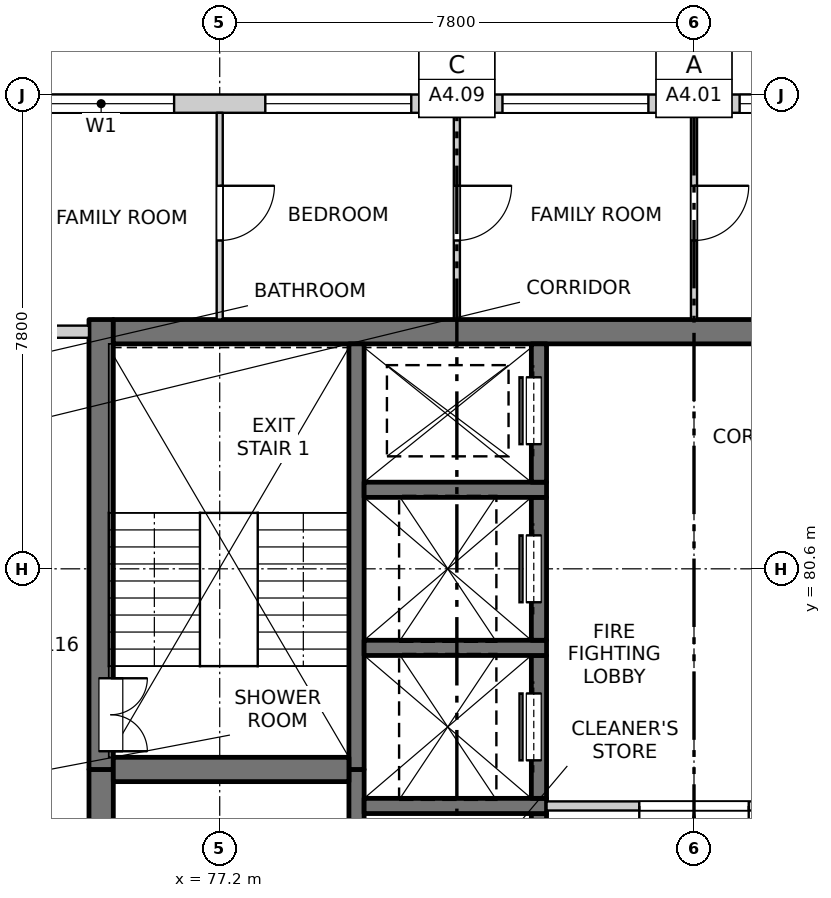
"""IFC4 building model, lengths in metres.
Left out: names, types, materials, properties, quantities, classifications, styles, units other than length and angle.
Written with IfcOpenShell. Run it as: python <this file> out.ifc"""

import sys

from ifc_helpers import new_model, si_unit, direction, frame, frame_2d, origin, place, context, subcontext, project, spatial, rectangle, extrude, element, fill, save


model = new_model("IFC4")
c1 = context("Model", 3, precision=1e-05, world=origin(), true_north=direction((0.0, 1.0)))
c2 = subcontext(c1, "Body", "Model", "MODEL_VIEW")
j1 = project(units=[si_unit("LENGTHUNIT", "METRE"), si_unit("PLANEANGLEUNIT", "RADIAN")], contexts=[c1])
p1 = place(None, origin())
s1 = spatial("IfcSite", under=j1, at=p1, CompositionType="ELEMENT")
p2 = place(p1, origin())
s2 = spatial("IfcBuilding", under=s1, at=p2, CompositionType="ELEMENT")
p3 = place(p2, frame((0.0, 0.0, 221.1)))
s3 = spatial("IfcBuildingStorey", under=s2, at=p3, CompositionType="ELEMENT", Elevation=221.1)
p4 = place(p3, frame((75.25, 55.05, -0.25), z_axis=(0.0, 0.0, 1.0), x_axis=(0.0, 1.0, 0.0)))
e1 = element("IfcWall", 1, at=p4, inside=s3, PredefinedType="SOLIDWALL", context=c2, shape_type="SweptSolid", body=[
    extrude(rectangle(XDim=22.25, YDim=0.4, at=frame_2d((11.125, 0.0))), origin(), (0.0, 0.0, 1.0), 3.4),
])
p5 = place(p4, frame((7.4, 0.0, 0.25)))
e2 = element("IfcOpeningElement", 2, at=p5, cuts=e1, PredefinedType="OPENING", context=c2, shape_type="SweptSolid", body=[
    extrude(rectangle(XDim=0.9, YDim=2.1, at=frame_2d((0.45, 1.05))), frame((0.0, 0.21, 0.0), z_axis=(0.0, -1.0, 0.0), x_axis=(1.0, 0.0, 0.0)), (0.0, 0.0, 1.0), 0.42),
])
p6 = place(p4, frame((13.7, 0.0, 0.25)))
e3 = element("IfcOpeningElement", 3, at=p6, cuts=e1, PredefinedType="OPENING", context=c2, shape_type="SweptSolid", body=[
    extrude(rectangle(XDim=0.9, YDim=2.1, at=frame_2d((0.45, 1.05))), frame((0.0, 0.21, 0.0), z_axis=(0.0, -1.0, 0.0), x_axis=(1.0, 0.0, 0.0)), (0.0, 0.0, 1.0), 0.42),
])
p7 = place(p4, frame((20.0, 0.0, 0.25)))
e4 = element("IfcOpeningElement", 4, at=p7, cuts=e1, PredefinedType="OPENING", context=c2, shape_type="SweptSolid", body=[
    extrude(rectangle(XDim=0.9, YDim=2.1, at=frame_2d((0.45, 1.05))), frame((0.0, 0.21, 0.0), z_axis=(0.0, -1.0, 0.0), x_axis=(1.0, 0.0, 0.0)), (0.0, 0.0, 1.0), 0.42),
])
p8 = place(p3, frame((75.25, 77.3, -0.25), z_axis=(0.0, 0.0, 1.0), x_axis=(0.0, 1.0, 0.0)))
e5 = element("IfcWall", 5, at=p8, inside=s3, PredefinedType="SOLIDWALL", context=c2, shape_type="SweptSolid", body=[
    extrude(rectangle(XDim=7.4, YDim=0.4, at=frame_2d((3.7, 0.0))), origin(), (0.0, 0.0, 1.0), 3.4),
])
p9 = place(p8, frame((0.3, 0.0, 0.25)))
e6 = element("IfcOpeningElement", 6, at=p9, cuts=e5, PredefinedType="OPENING", context=c2, shape_type="SweptSolid", body=[
    extrude(rectangle(XDim=1.2, YDim=2.1, at=frame_2d((0.6, 1.05))), frame((0.0, 0.21, 0.0), z_axis=(0.0, -1.0, 0.0), x_axis=(1.0, 0.0, 0.0)), (0.0, 0.0, 1.0), 0.42),
])
p10 = place(p3, frame((75.45, 84.5, -0.25), z_axis=(0.0, 0.0, 1.0), x_axis=(1.0, 0.0, 0.0)))
e7 = element("IfcWall", 7, at=p10, inside=s3, PredefinedType="SOLIDWALL", context=c2, shape_type="SweptSolid", body=[
    extrude(rectangle(XDim=19.1, YDim=0.4, at=frame_2d((9.55, 0.0))), origin(), (0.0, 0.0, 1.0), 3.4),
])
p11 = place(p3, frame((79.45, 60.975, -0.25), z_axis=(0.0, 0.0, 1.0), x_axis=(0.0, 1.0, 0.0)))
e8 = element("IfcWall", 8, at=p11, inside=s3, PredefinedType="SOLIDWALL", context=c2, shape_type="SweptSolid", body=[
    extrude(rectangle(XDim=16.325, YDim=0.25, at=frame_2d((8.163, 0.0))), origin(), (0.0, 0.0, 1.0), 3.4),
])
p12 = place(p3, frame((79.45, 77.3, -0.25), z_axis=(0.0, 0.0, 1.0), x_axis=(0.0, 1.0, 0.0)))
e9 = element("IfcWall", 9, at=p12, inside=s3, PredefinedType="SOLIDWALL", context=c2, shape_type="SweptSolid", body=[
    extrude(rectangle(XDim=7.0, YDim=0.25, at=frame_2d((3.5, 0.0))), origin(), (0.0, 0.0, 1.0), 3.4),
])
p13 = place(p3, frame((82.45, 74.225, -0.25), z_axis=(0.0, 0.0, 1.0), x_axis=(0.0, 1.0, 0.0)))
e10 = element("IfcWall", 10, at=p13, inside=s3, PredefinedType="SOLIDWALL", context=c2, shape_type="SweptSolid", body=[
    extrude(rectangle(XDim=2.35, YDim=0.25, at=frame_2d((1.175, 0.0))), origin(), (0.0, 0.0, 1.0), 3.4),
])
p14 = place(p13, frame((0.725, 0.0, 0.25)))
e11 = element("IfcOpeningElement", 11, at=p14, cuts=e10, PredefinedType="OPENING", context=c2, shape_type="SweptSolid", body=[
    extrude(rectangle(XDim=0.9, YDim=2.1, at=frame_2d((0.45, 1.05))), frame((0.0, 0.135, 0.0), z_axis=(0.0, -1.0, 0.0), x_axis=(1.0, 0.0, 0.0)), (0.0, 0.0, 1.0), 0.27),
])
p15 = place(p3, frame((79.575, 76.7, -0.25), z_axis=(0.0, 0.0, 1.0), x_axis=(1.0, 0.0, 0.0)))
e12 = element("IfcWall", 12, at=p15, inside=s3, PredefinedType="SOLIDWALL", context=c2, shape_type="SweptSolid", body=[
    extrude(rectangle(XDim=3.0, YDim=0.25, at=frame_2d((1.5, 0.0))), origin(), (0.0, 0.0, 1.0), 3.4),
])
p16 = place(p3, frame((82.45, 76.825, -0.25), z_axis=(0.0, 0.0, 1.0), x_axis=(0.0, 1.0, 0.0)))
e13 = element("IfcWall", 13, at=p16, inside=s3, PredefinedType="SOLIDWALL", context=c2, shape_type="SweptSolid", body=[
    extrude(rectangle(XDim=2.35, YDim=0.25, at=frame_2d((1.175, 0.0))), origin(), (0.0, 0.0, 1.0), 3.4),
])
p17 = place(p16, frame((0.625, 0.0, 0.25)))
e14 = element("IfcOpeningElement", 14, at=p17, cuts=e13, PredefinedType="OPENING", context=c2, shape_type="SweptSolid", body=[
    extrude(rectangle(XDim=1.1, YDim=2.1, at=frame_2d((0.55, 1.05))), frame((0.0, 0.135, 0.0), z_axis=(0.0, -1.0, 0.0), x_axis=(1.0, 0.0, 0.0)), (0.0, 0.0, 1.0), 0.27),
])
p18 = place(p3, frame((79.575, 79.3, -0.25), z_axis=(0.0, 0.0, 1.0), x_axis=(1.0, 0.0, 0.0)))
e15 = element("IfcWall", 15, at=p18, inside=s3, PredefinedType="SOLIDWALL", context=c2, shape_type="SweptSolid", body=[
    extrude(rectangle(XDim=3.0, YDim=0.25, at=frame_2d((1.5, 0.0))), origin(), (0.0, 0.0, 1.0), 3.4),
])
p19 = place(p3, frame((82.45, 79.425, -0.25), z_axis=(0.0, 0.0, 1.0), x_axis=(0.0, 1.0, 0.0)))
e16 = element("IfcWall", 16, at=p19, inside=s3, PredefinedType="SOLIDWALL", context=c2, shape_type="SweptSolid", body=[
    extrude(rectangle(XDim=2.35, YDim=0.25, at=frame_2d((1.175, 0.0))), origin(), (0.0, 0.0, 1.0), 3.4),
])
p20 = place(p19, frame((0.625, 0.0, 0.25)))
e17 = element("IfcOpeningElement", 17, at=p20, cuts=e16, PredefinedType="OPENING", context=c2, shape_type="SweptSolid", body=[
    extrude(rectangle(XDim=1.1, YDim=2.1, at=frame_2d((0.55, 1.05))), frame((0.0, 0.135, 0.0), z_axis=(0.0, -1.0, 0.0), x_axis=(1.0, 0.0, 0.0)), (0.0, 0.0, 1.0), 0.27),
])
p21 = place(p3, frame((79.575, 81.9, -0.25), z_axis=(0.0, 0.0, 1.0), x_axis=(1.0, 0.0, 0.0)))
e18 = element("IfcWall", 18, at=p21, inside=s3, PredefinedType="SOLIDWALL", context=c2, shape_type="SweptSolid", body=[
    extrude(rectangle(XDim=3.0, YDim=0.25, at=frame_2d((1.5, 0.0))), origin(), (0.0, 0.0, 1.0), 3.4),
])
p22 = place(p3, frame((82.45, 82.025, -0.25), z_axis=(0.0, 0.0, 1.0), x_axis=(0.0, 1.0, 0.0)))
e19 = element("IfcWall", 19, at=p22, inside=s3, PredefinedType="SOLIDWALL", context=c2, shape_type="SweptSolid", body=[
    extrude(rectangle(XDim=2.275, YDim=0.25, at=frame_2d((1.138, 0.0))), origin(), (0.0, 0.0, 1.0), 3.4),
])
p23 = place(p22, frame((0.625, 0.0, 0.25)))
e20 = element("IfcOpeningElement", 20, at=p23, cuts=e19, PredefinedType="OPENING", context=c2, shape_type="SweptSolid", body=[
    extrude(rectangle(XDim=1.1, YDim=2.1, at=frame_2d((0.55, 1.05))), frame((0.0, 0.135, 0.0), z_axis=(0.0, -1.0, 0.0), x_axis=(1.0, 0.0, 0.0)), (0.0, 0.0, 1.0), 0.27),
])
p24 = place(p3, frame((75.45, 77.3, -0.25), z_axis=(0.0, 0.0, 1.0), x_axis=(1.0, 0.0, 0.0)))
e21 = element("IfcWall", 21, at=p24, inside=s3, PredefinedType="SOLIDWALL", context=c2, shape_type="SweptSolid", body=[
    extrude(rectangle(XDim=3.875, YDim=0.4, at=frame_2d((1.938, 0.0))), origin(), (0.0, 0.0, 1.0), 3.4),
])
p25 = place(p3, frame((73.7, 88.25, 0.0), z_axis=(0.0, 0.0, 1.0), x_axis=(1.0, 0.0, 0.0)))
e22 = element("IfcWall", 22, at=p25, inside=s3, PredefinedType="SOLIDWALL", context=c2, shape_type="SweptSolid", body=[
    extrude(rectangle(XDim=22.6, YDim=0.3, at=frame_2d((11.3, 0.0))), origin(), (0.0, 0.0, 1.0), 2.7),
])
p26 = place(p25, frame((0.35, 0.0, 0.9)))
e23 = element("IfcOpeningElement", 23, at=p26, cuts=e22, PredefinedType="OPENING", context=c2, shape_type="SweptSolid", body=[
    extrude(rectangle(XDim=2.4, YDim=1.8, at=frame_2d((1.2, 0.9))), frame((0.0, 0.16, 0.0), z_axis=(0.0, -1.0, 0.0), x_axis=(1.0, 0.0, 0.0)), (0.0, 0.0, 1.0), 0.32),
])
p27 = place(p25, frame((4.25, 0.0, 0.9)))
e24 = element("IfcOpeningElement", 24, at=p27, cuts=e22, PredefinedType="OPENING", context=c2, shape_type="SweptSolid", body=[
    extrude(rectangle(XDim=2.4, YDim=1.8, at=frame_2d((1.2, 0.9))), frame((0.0, 0.16, 0.0), z_axis=(0.0, -1.0, 0.0), x_axis=(1.0, 0.0, 0.0)), (0.0, 0.0, 1.0), 0.32),
])
p28 = place(p25, frame((8.15, 0.0, 0.9)))
e25 = element("IfcOpeningElement", 25, at=p28, cuts=e22, PredefinedType="OPENING", context=c2, shape_type="SweptSolid", body=[
    extrude(rectangle(XDim=2.4, YDim=1.8, at=frame_2d((1.2, 0.9))), frame((0.0, 0.16, 0.0), z_axis=(0.0, -1.0, 0.0), x_axis=(1.0, 0.0, 0.0)), (0.0, 0.0, 1.0), 0.32),
])
p29 = place(p25, frame((12.05, 0.0, 0.9)))
e26 = element("IfcOpeningElement", 26, at=p29, cuts=e22, PredefinedType="OPENING", context=c2, shape_type="SweptSolid", body=[
    extrude(rectangle(XDim=2.4, YDim=1.8, at=frame_2d((1.2, 0.9))), frame((0.0, 0.16, 0.0), z_axis=(0.0, -1.0, 0.0), x_axis=(1.0, 0.0, 0.0)), (0.0, 0.0, 1.0), 0.32),
])
p30 = place(p25, frame((15.95, 0.0, 0.9)))
e27 = element("IfcOpeningElement", 27, at=p30, cuts=e22, PredefinedType="OPENING", context=c2, shape_type="SweptSolid", body=[
    extrude(rectangle(XDim=2.4, YDim=1.8, at=frame_2d((1.2, 0.9))), frame((0.0, 0.16, 0.0), z_axis=(0.0, -1.0, 0.0), x_axis=(1.0, 0.0, 0.0)), (0.0, 0.0, 1.0), 0.32),
])
p31 = place(p25, frame((19.85, 0.0, 0.9)))
e28 = element("IfcOpeningElement", 28, at=p31, cuts=e22, PredefinedType="OPENING", context=c2, shape_type="SweptSolid", body=[
    extrude(rectangle(XDim=2.4, YDim=1.8, at=frame_2d((1.2, 0.9))), frame((0.0, 0.16, 0.0), z_axis=(0.0, -1.0, 0.0), x_axis=(1.0, 0.0, 0.0)), (0.0, 0.0, 1.0), 0.32),
])
p32 = place(p3, frame((82.575, 76.7, 0.0), z_axis=(0.0, 0.0, 1.0), x_axis=(1.0, 0.0, 0.0)))
e29 = element("IfcWall", 29, at=p32, inside=s3, PredefinedType="PARTITIONING", context=c2, shape_type="SweptSolid", body=[
    extrude(rectangle(XDim=4.85, YDim=0.15, at=frame_2d((2.425, 0.0))), origin(), (0.0, 0.0, 1.0), 3.15),
])
p33 = place(p32, frame((1.525, 0.0, 0.0)))
e30 = element("IfcOpeningElement", 30, at=p33, cuts=e29, PredefinedType="OPENING", context=c2, shape_type="SweptSolid", body=[
    extrude(rectangle(XDim=1.8, YDim=2.1, at=frame_2d((0.9, 1.05))), frame((0.0, 0.085, 0.0), z_axis=(0.0, -1.0, 0.0), x_axis=(1.0, 0.0, 0.0)), (0.0, 0.0, 1.0), 0.17),
])
p34 = place(p3, frame((73.2, 84.5, 0.0), z_axis=(0.0, 0.0, 1.0), x_axis=(1.0, 0.0, 0.0)))
e31 = element("IfcWall", 31, at=p34, inside=s3, PredefinedType="PARTITIONING", context=c2, shape_type="SweptSolid", body=[
    extrude(rectangle(XDim=1.85, YDim=0.2, at=frame_2d((0.925, 0.0))), origin(), (0.0, 0.0, 1.0), 3.15),
])
p35 = place(p3, frame((77.2, 84.7, 0.0), z_axis=(0.0, 0.0, 1.0), x_axis=(0.0, 1.0, 0.0)))
e32 = element("IfcWall", 32, at=p35, inside=s3, PredefinedType="PARTITIONING", context=c2, shape_type="SweptSolid", body=[
    extrude(rectangle(XDim=3.4, YDim=0.1, at=frame_2d((1.7, 0.0))), origin(), (0.0, 0.0, 1.0), 3.15),
])
p36 = place(p35, frame((1.3, 0.0, 0.0)))
e33 = element("IfcOpeningElement", 33, at=p36, cuts=e32, PredefinedType="OPENING", context=c2, shape_type="SweptSolid", body=[
    extrude(rectangle(XDim=0.9, YDim=2.1, at=frame_2d((0.45, 1.05))), frame((0.0, 0.06, 0.0), z_axis=(0.0, -1.0, 0.0), x_axis=(1.0, 0.0, 0.0)), (0.0, 0.0, 1.0), 0.12),
])
p37 = place(p3, frame((81.1, 84.7, 0.0), z_axis=(0.0, 0.0, 1.0), x_axis=(0.0, 1.0, 0.0)))
e34 = element("IfcWall", 34, at=p37, inside=s3, PredefinedType="PARTITIONING", context=c2, shape_type="SweptSolid", body=[
    extrude(rectangle(XDim=3.4, YDim=0.1, at=frame_2d((1.7, 0.0))), origin(), (0.0, 0.0, 1.0), 3.15),
])
p38 = place(p37, frame((1.3, 0.0, 0.0)))
e35 = element("IfcOpeningElement", 35, at=p38, cuts=e34, PredefinedType="OPENING", context=c2, shape_type="SweptSolid", body=[
    extrude(rectangle(XDim=0.9, YDim=2.1, at=frame_2d((0.45, 1.05))), frame((0.0, 0.06, 0.0), z_axis=(0.0, -1.0, 0.0), x_axis=(1.0, 0.0, 0.0)), (0.0, 0.0, 1.0), 0.12),
])
p39 = place(p3, frame((85.0, 84.7, 0.0), z_axis=(0.0, 0.0, 1.0), x_axis=(0.0, 1.0, 0.0)))
e36 = element("IfcWall", 36, at=p39, inside=s3, PredefinedType="PARTITIONING", context=c2, shape_type="SweptSolid", body=[
    extrude(rectangle(XDim=3.4, YDim=0.1, at=frame_2d((1.7, 0.0))), origin(), (0.0, 0.0, 1.0), 3.15),
])
p40 = place(p39, frame((1.3, 0.0, 0.0)))
e37 = element("IfcOpeningElement", 37, at=p40, cuts=e36, PredefinedType="OPENING", context=c2, shape_type="SweptSolid", body=[
    extrude(rectangle(XDim=0.9, YDim=2.1, at=frame_2d((0.45, 1.05))), frame((0.0, 0.06, 0.0), z_axis=(0.0, -1.0, 0.0), x_axis=(1.0, 0.0, 0.0)), (0.0, 0.0, 1.0), 0.12),
])
p41 = place(p26, origin())
e38 = element("IfcWindow", 38, at=p41, inside=s3, PartitioningType="DOUBLE_PANEL_VERTICAL", PredefinedType="WINDOW", context=c2, shape_type="SweptSolid", body=[
    extrude(rectangle(XDim=2.4, YDim=1.8, at=frame_2d((1.2, 0.9))), frame((0.0, 0.03, 0.0), z_axis=(0.0, -1.0, 0.0), x_axis=(1.0, 0.0, 0.0)), (0.0, 0.0, 1.0), 0.06),
])
fill(e23, e38)
p42 = place(p27, origin())
e39 = element("IfcWindow", 39, at=p42, inside=s3, PartitioningType="DOUBLE_PANEL_VERTICAL", PredefinedType="WINDOW", context=c2, shape_type="SweptSolid", body=[
    extrude(rectangle(XDim=2.4, YDim=1.8, at=frame_2d((1.2, 0.9))), frame((0.0, 0.03, 0.0), z_axis=(0.0, -1.0, 0.0), x_axis=(1.0, 0.0, 0.0)), (0.0, 0.0, 1.0), 0.06),
])
fill(e24, e39)
p43 = place(p28, origin())
e40 = element("IfcWindow", 40, at=p43, inside=s3, PartitioningType="DOUBLE_PANEL_VERTICAL", PredefinedType="WINDOW", context=c2, shape_type="SweptSolid", body=[
    extrude(rectangle(XDim=2.4, YDim=1.8, at=frame_2d((1.2, 0.9))), frame((0.0, 0.03, 0.0), z_axis=(0.0, -1.0, 0.0), x_axis=(1.0, 0.0, 0.0)), (0.0, 0.0, 1.0), 0.06),
])
fill(e25, e40)
p44 = place(p29, origin())
e41 = element("IfcWindow", 41, at=p44, inside=s3, PartitioningType="DOUBLE_PANEL_VERTICAL", PredefinedType="WINDOW", context=c2, shape_type="SweptSolid", body=[
    extrude(rectangle(XDim=2.4, YDim=1.8, at=frame_2d((1.2, 0.9))), frame((0.0, 0.03, 0.0), z_axis=(0.0, -1.0, 0.0), x_axis=(1.0, 0.0, 0.0)), (0.0, 0.0, 1.0), 0.06),
])
fill(e26, e41)
p45 = place(p33, origin())
e42 = element("IfcDoor", 42, at=p45, inside=s3, OperationType="DOUBLE_DOOR_SINGLE_SWING", PredefinedType="DOOR", context=c2, shape_type="SweptSolid", body=[
    extrude(rectangle(XDim=1.8, YDim=2.1, at=frame_2d((0.9, 1.05))), frame((0.0, 0.025, 0.0), z_axis=(0.0, -1.0, 0.0), x_axis=(1.0, 0.0, 0.0)), (0.0, 0.0, 1.0), 0.05),
])
fill(e30, e42)
p46 = place(p17, origin())
e43 = element("IfcDoor", 43, at=p46, inside=s3, OperationType="SLIDING_TO_LEFT", PredefinedType="DOOR", context=c2, shape_type="SweptSolid", body=[
    extrude(rectangle(XDim=1.1, YDim=2.1, at=frame_2d((0.55, 1.05))), frame((0.0, 0.11, 0.0), z_axis=(0.0, -1.0, 0.0), x_axis=(1.0, 0.0, 0.0)), (0.0, 0.0, 1.0), 0.05),
])
fill(e14, e43)
p47 = place(p9, origin())
e44 = element("IfcDoor", 44, at=p47, inside=s3, OperationType="DOUBLE_DOOR_SINGLE_SWING", PredefinedType="DOOR", context=c2, shape_type="SweptSolid", body=[
    extrude(rectangle(XDim=1.2, YDim=2.1, at=frame_2d((0.6, 1.05))), frame((0.0, -0.135, 0.0), z_axis=(0.0, -1.0, 0.0), x_axis=(1.0, 0.0, 0.0)), (0.0, 0.0, 1.0), 0.05),
])
fill(e6, e44)
p48 = place(p20, origin())
e45 = element("IfcDoor", 45, at=p48, inside=s3, OperationType="SLIDING_TO_LEFT", PredefinedType="DOOR", context=c2, shape_type="SweptSolid", body=[
    extrude(rectangle(XDim=1.1, YDim=2.1, at=frame_2d((0.55, 1.05))), frame((0.0, 0.11, 0.0), z_axis=(0.0, -1.0, 0.0), x_axis=(1.0, 0.0, 0.0)), (0.0, 0.0, 1.0), 0.05),
])
fill(e17, e45)
p49 = place(p23, origin())
e46 = element("IfcDoor", 46, at=p49, inside=s3, OperationType="SLIDING_TO_RIGHT", PredefinedType="DOOR", context=c2, shape_type="SweptSolid", body=[
    extrude(rectangle(XDim=1.1, YDim=2.1, at=frame_2d((0.55, 1.05))), frame((0.0, 0.11, 0.0), z_axis=(0.0, -1.0, 0.0), x_axis=(1.0, 0.0, 0.0)), (0.0, 0.0, 1.0), 0.05),
])
fill(e20, e46)
p50 = place(p36, origin())
e47 = element("IfcDoor", 47, at=p50, inside=s3, OperationType="SINGLE_SWING_LEFT", PredefinedType="DOOR", context=c2, shape_type="SweptSolid", body=[
    extrude(rectangle(XDim=0.9, YDim=2.1, at=frame_2d((0.45, 1.05))), frame((0.0, 0.025, 0.0), z_axis=(0.0, -1.0, 0.0), x_axis=(1.0, 0.0, 0.0)), (0.0, 0.0, 1.0), 0.05),
])
fill(e33, e47)
p51 = place(p38, origin())
e48 = element("IfcDoor", 48, at=p51, inside=s3, OperationType="SINGLE_SWING_LEFT", PredefinedType="DOOR", context=c2, shape_type="SweptSolid", body=[
    extrude(rectangle(XDim=0.9, YDim=2.1, at=frame_2d((0.45, 1.05))), frame((0.0, 0.025, 0.0), z_axis=(0.0, -1.0, 0.0), x_axis=(1.0, 0.0, 0.0)), (0.0, 0.0, 1.0), 0.05),
])
fill(e35, e48)
p52 = place(p40, origin())
e49 = element("IfcDoor", 49, at=p52, inside=s3, OperationType="SINGLE_SWING_LEFT", PredefinedType="DOOR", context=c2, shape_type="SweptSolid", body=[
    extrude(rectangle(XDim=0.9, YDim=2.1, at=frame_2d((0.45, 1.05))), frame((0.0, 0.025, 0.0), z_axis=(0.0, -1.0, 0.0), x_axis=(1.0, 0.0, 0.0)), (0.0, 0.0, 1.0), 0.05),
])
fill(e37, e49)
save(model, sys.argv[1])
